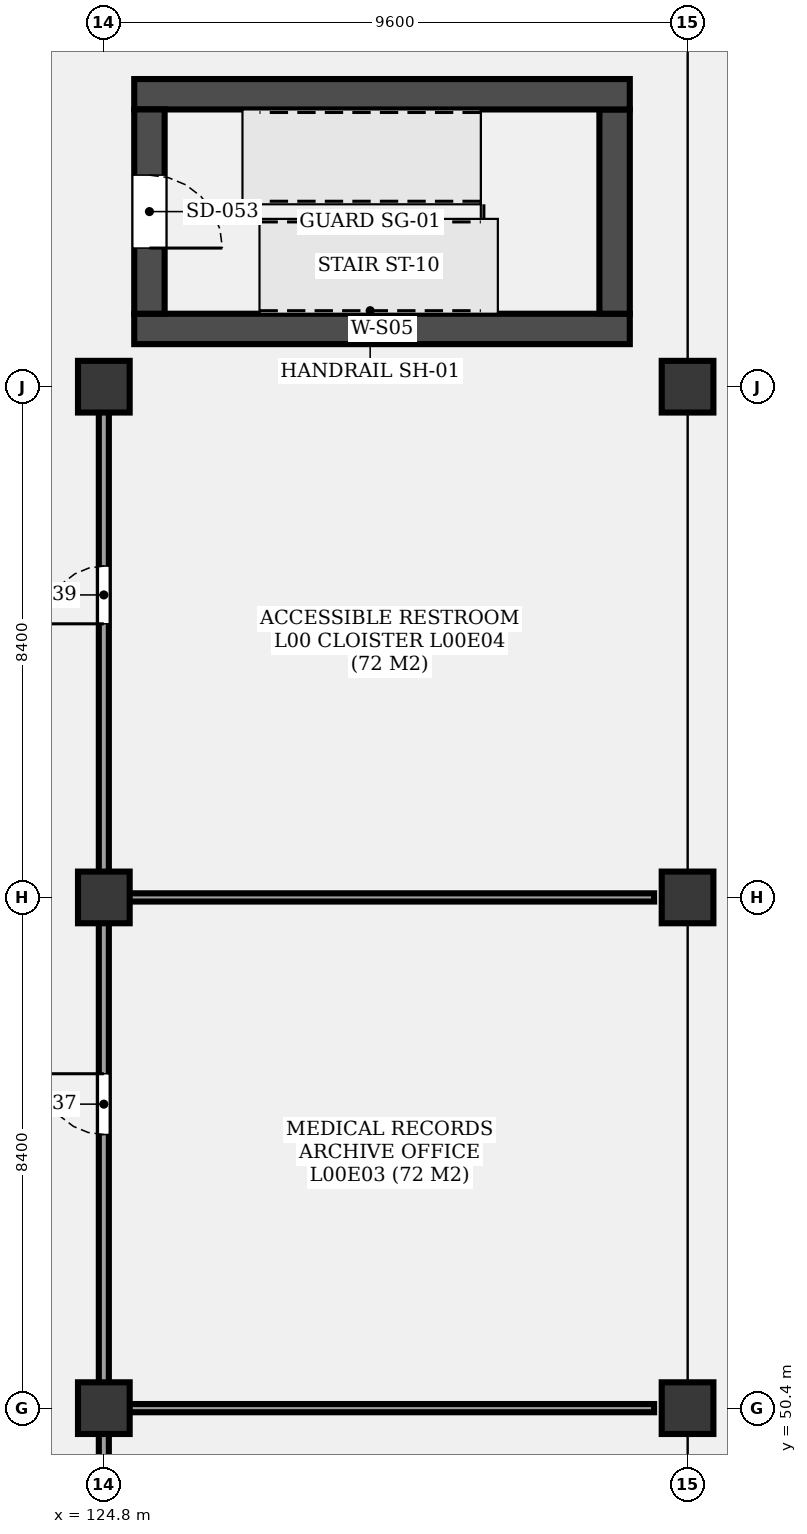
"""IFC4 building model, lengths in metres.
Left out: names, types, materials, properties, quantities, classifications, styles, units other than length and angle.
Written with IfcOpenShell. Run it as: python <this file> out.ifc"""

import sys

from ifc_helpers import new_model, si_unit, direction, frame, frame_2d, origin, origin_2d, place, context, subcontext, project, spatial, rectangle, extrude, element, fill, save


model = new_model("IFC4")
c1 = context("Model", 3, precision=1e-05, world=origin(), true_north=direction((0.0, 1.0)))
c2 = subcontext(c1, "Body", "Model", "MODEL_VIEW")
j1 = project(units=[si_unit("LENGTHUNIT", "METRE"), si_unit("PLANEANGLEUNIT", "RADIAN")], contexts=[c1])
p1 = place(None, origin())
s1 = spatial("IfcSite", under=j1, at=p1, CompositionType="ELEMENT")
p2 = place(p1, origin())
s2 = spatial("IfcBuilding", under=s1, at=p2, CompositionType="ELEMENT")
p3 = place(p2, origin())
s3 = spatial("IfcBuildingStorey", under=s2, at=p3, CompositionType="ELEMENT", Elevation=0.0)
for number, where, z_axis, x_axis in (
    (1, (124.8, 50.4, -0.35), (0.0, 0.0, 1.0), (1.0, 0.0, 0.0)),
    (2, (124.8, 58.8, -0.35), (0.0, 0.0, 1.0), (1.0, 0.0, 0.0)),
    (3, (124.8, 67.2, -0.35), (0.0, 0.0, 1.0), (1.0, 0.0, 0.0)),
    (4, (134.4, 50.4, -0.35), (0.0, 0.0, 1.0), (1.0, 0.0, 0.0)),
    (5, (134.4, 58.8, -0.35), (0.0, 0.0, 1.0), (1.0, 0.0, 0.0)),
    (6, (134.4, 67.2, -0.35), (0.0, 0.0, 1.0), (1.0, 0.0, 0.0)),
):
    element("IfcColumn", number, at=place(p3, frame(where, z_axis=z_axis, x_axis=x_axis)), inside=s3, PredefinedType="COLUMN", context=c2, shape_type="SweptSolid", body=[
        extrude(rectangle(XDim=0.85, YDim=0.85, at=origin_2d()), origin(), (0.0, 0.0, 1.0), 5.45),
    ])
p4 = place(p3, frame((125.3, 68.15, 0.0), z_axis=(0.0, 0.0, 1.0), x_axis=(1.0, 0.0, 0.0)))
e7 = element("IfcWall", 7, at=p4, inside=s3, PredefinedType="SHEAR", context=c2, shape_type="SweptSolid", body=[
    extrude(rectangle(XDim=8.15, YDim=0.5, at=frame_2d((4.075, 0.0))), origin(), (0.0, 0.0, 1.0), 5.1),
])
p5 = place(p3, frame((133.2, 68.4, 0.0), z_axis=(0.0, 0.0, 1.0), x_axis=(0.0, 1.0, 0.0)))
e8 = element("IfcWall", 8, at=p5, inside=s3, PredefinedType="SHEAR", context=c2, shape_type="SweptSolid", body=[
    extrude(rectangle(XDim=3.36, YDim=0.5, at=frame_2d((1.68, 0.0))), origin(), (0.0, 0.0, 1.0), 5.1),
])
p6 = place(p3, frame((133.45, 72.01, 0.0), z_axis=(0.0, 0.0, 1.0), x_axis=(-1.0, 0.0, 0.0)))
e9 = element("IfcWall", 9, at=p6, inside=s3, PredefinedType="SHEAR", context=c2, shape_type="SweptSolid", body=[
    extrude(rectangle(XDim=8.15, YDim=0.5, at=frame_2d((4.075, 0.0))), origin(), (0.0, 0.0, 1.0), 5.1),
])
p7 = place(p3, frame((125.55, 71.76, 0.0), z_axis=(0.0, 0.0, 1.0), x_axis=(0.0, -1.0, 0.0)))
e10 = element("IfcWall", 10, at=p7, inside=s3, PredefinedType="SHEAR", context=c2, shape_type="SweptSolid", body=[
    extrude(rectangle(XDim=3.36, YDim=0.5, at=frame_2d((1.68, 0.0))), origin(), (0.0, 0.0, 1.0), 5.1),
])
p8 = place(p7, frame((1.08, 0.0, 0.0)))
e11 = element("IfcOpeningElement", 11, at=p8, cuts=e10, PredefinedType="OPENING", context=c2, shape_type="SweptSolid", body=[
    extrude(rectangle(XDim=1.2, YDim=2.2, at=frame_2d((0.6, 1.1))), frame((0.0, 0.26, 0.0), z_axis=(0.0, -1.0, 0.0), x_axis=(1.0, 0.0, 0.0)), (0.0, 0.0, 1.0), 0.52),
])
p9 = place(p3, frame((124.8, 42.25, 0.0), z_axis=(0.0, 0.0, 1.0), x_axis=(0.0, 1.0, 0.0)))
e12 = element("IfcWall", 12, at=p9, inside=s3, PredefinedType="PARTITIONING", context=c2, shape_type="SweptSolid", body=[
    extrude(rectangle(XDim=7.9, YDim=0.165, at=frame_2d((3.95, 0.0))), origin(), (0.0, 0.0, 1.0), 3.98),
])
p10 = place(p9, frame((4.25, 0.0, 0.0)))
e13 = element("IfcOpeningElement", 13, at=p10, cuts=e12, PredefinedType="OPENING", context=c2, shape_type="SweptSolid", body=[
    extrude(rectangle(XDim=0.95, YDim=2.1, at=frame_2d((0.475, 1.05))), frame((0.0, 0.093, 0.0), z_axis=(0.0, -1.0, 0.0), x_axis=(1.0, 0.0, 0.0)), (0.0, 0.0, 1.0), 0.185),
])
p11 = place(p3, frame((124.8, 50.65, 0.0), z_axis=(0.0, 0.0, 1.0), x_axis=(0.0, 1.0, 0.0)))
e14 = element("IfcWall", 14, at=p11, inside=s3, PredefinedType="PARTITIONING", context=c2, shape_type="SweptSolid", body=[
    extrude(rectangle(XDim=7.9, YDim=0.165, at=frame_2d((3.95, 0.0))), origin(), (0.0, 0.0, 1.0), 3.98),
])
p12 = place(p11, frame((4.25, 0.0, 0.0)))
e15 = element("IfcOpeningElement", 15, at=p12, cuts=e14, PredefinedType="OPENING", context=c2, shape_type="SweptSolid", body=[
    extrude(rectangle(XDim=1.0, YDim=2.2, at=frame_2d((0.5, 1.1))), frame((0.0, 0.093, 0.0), z_axis=(0.0, -1.0, 0.0), x_axis=(1.0, 0.0, 0.0)), (0.0, 0.0, 1.0), 0.185),
])
p13 = place(p3, frame((124.95, 50.4, 0.0), z_axis=(0.0, 0.0, 1.0), x_axis=(1.0, 0.0, 0.0)))
e16 = element("IfcWall", 16, at=p13, inside=s3, PredefinedType="PARTITIONING", context=c2, shape_type="SweptSolid", body=[
    extrude(rectangle(XDim=8.9, YDim=0.135, at=frame_2d((4.45, 0.0))), origin(), (0.0, 0.0, 1.0), 3.98),
])
p14 = place(p3, frame((124.8, 59.05, 0.0), z_axis=(0.0, 0.0, 1.0), x_axis=(0.0, 1.0, 0.0)))
e17 = element("IfcWall", 17, at=p14, inside=s3, PredefinedType="PARTITIONING", context=c2, shape_type="SweptSolid", body=[
    extrude(rectangle(XDim=7.9, YDim=0.165, at=frame_2d((3.95, 0.0))), origin(), (0.0, 0.0, 1.0), 3.98),
])
p15 = place(p14, frame((4.25, 0.0, 0.0)))
e18 = element("IfcOpeningElement", 18, at=p15, cuts=e17, PredefinedType="OPENING", context=c2, shape_type="SweptSolid", body=[
    extrude(rectangle(XDim=0.95, YDim=2.1, at=frame_2d((0.475, 1.05))), frame((0.0, 0.093, 0.0), z_axis=(0.0, -1.0, 0.0), x_axis=(1.0, 0.0, 0.0)), (0.0, 0.0, 1.0), 0.185),
])
p16 = place(p3, frame((124.95, 58.8, 0.0), z_axis=(0.0, 0.0, 1.0), x_axis=(1.0, 0.0, 0.0)))
e19 = element("IfcWall", 19, at=p16, inside=s3, PredefinedType="PARTITIONING", context=c2, shape_type="SweptSolid", body=[
    extrude(rectangle(XDim=8.9, YDim=0.135, at=frame_2d((4.45, 0.0))), origin(), (0.0, 0.0, 1.0), 3.98),
])
p17 = place(p8, origin())
e20 = element("IfcDoor", 20, at=p17, inside=s3, OperationType="SINGLE_SWING_RIGHT", PredefinedType="DOOR", context=c2, shape_type="SweptSolid", body=[
    extrude(rectangle(XDim=1.2, YDim=2.2, at=frame_2d((0.6, 1.1))), frame((0.0, 0.025, 0.0), z_axis=(0.0, -1.0, 0.0), x_axis=(1.0, 0.0, 0.0)), (0.0, 0.0, 1.0), 0.05),
])
fill(e11, e20)
p18 = place(p12, origin())
e21 = element("IfcDoor", 21, at=p18, inside=s3, OperationType="SINGLE_SWING_RIGHT", PredefinedType="DOOR", context=c2, shape_type="SweptSolid", body=[
    extrude(rectangle(XDim=1.0, YDim=2.2, at=frame_2d((0.5, 1.1))), frame((0.0, 0.025, 0.0), z_axis=(0.0, -1.0, 0.0), x_axis=(1.0, 0.0, 0.0)), (0.0, 0.0, 1.0), 0.05),
])
fill(e15, e21)
p19 = place(p15, origin())
e22 = element("IfcDoor", 22, at=p19, inside=s3, OperationType="SINGLE_SWING_LEFT", PredefinedType="DOOR", context=c2, shape_type="SweptSolid", body=[
    extrude(rectangle(XDim=0.95, YDim=2.1, at=frame_2d((0.475, 1.05))), frame((0.0, 0.025, 0.0), z_axis=(0.0, -1.0, 0.0), x_axis=(1.0, 0.0, 0.0)), (0.0, 0.0, 1.0), 0.05),
])
fill(e18, e22)
save(model, sys.argv[1])
